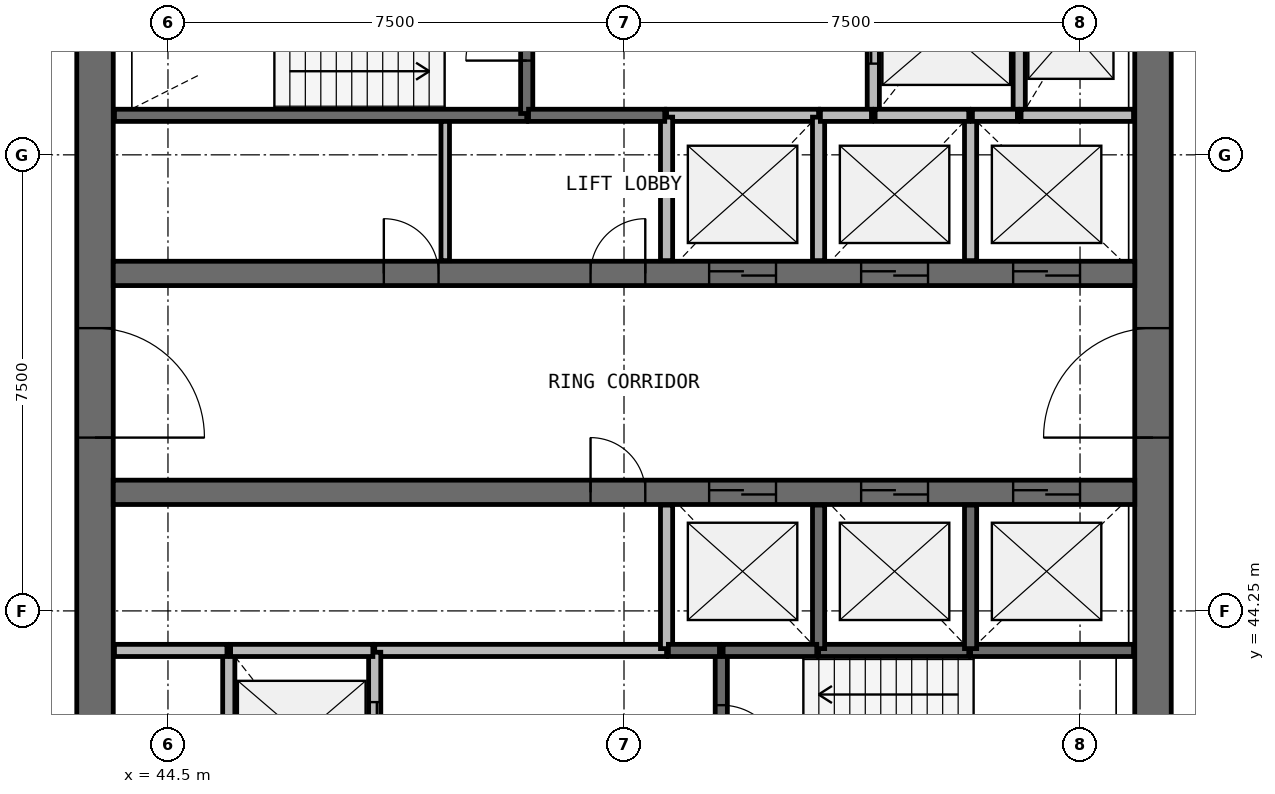
"""IFC4 building model, lengths in metres.
Left out: names, types, materials, properties, quantities, classifications, styles, units other than length and angle.
Written with IfcOpenShell. Run it as: python <this file> out.ifc"""

import sys

from ifc_helpers import new_model, si_unit, direction, frame, frame_2d, origin, place, context, subcontext, project, spatial, rectangle, extrude, source, transform, mapped, element, fill, save


model = new_model("IFC4")
c1 = context("Model", 3, precision=1e-05, world=origin(), true_north=direction((0.0, 1.0)))
c2 = subcontext(c1, "Body", "Model", "MODEL_VIEW")
j1 = project(units=[si_unit("LENGTHUNIT", "METRE"), si_unit("PLANEANGLEUNIT", "RADIAN")], contexts=[c1])
p1 = place(None, origin())
s1 = spatial("IfcSite", under=j1, at=p1, CompositionType="ELEMENT")
p2 = place(p1, origin())
s2 = spatial("IfcBuilding", under=s1, at=p2, CompositionType="ELEMENT")
p3 = place(p2, frame((0.0, 0.0, 199.4)))
s3 = spatial("IfcBuildingStorey", under=s2, at=p3, CompositionType="ELEMENT", Elevation=199.4)
p4 = place(p3, frame((60.7, 40.0, 0.0), z_axis=(0.0, 0.0, 1.0), x_axis=(0.0, 1.0, 0.0)))
e1 = element("IfcWall", 1, at=p4, inside=s3, PredefinedType="SHEAR", context=c2, shape_type="SweptSolid", body=[
    extrude(rectangle(XDim=16.0, YDim=0.6, at=frame_2d((8.0, 0.0))), origin(), (0.0, 0.0, 1.0), 3.9),
])
p5 = place(p4, frame((7.1, 0.0, 0.0)))
e2 = element("IfcOpeningElement", 2, at=p5, cuts=e1, PredefinedType="OPENING", context=c2, shape_type="SweptSolid", body=[
    extrude(rectangle(XDim=1.8, YDim=2.1, at=frame_2d((0.9, 1.05))), frame((0.0, 0.31, 0.0), z_axis=(0.0, -1.0, 0.0), x_axis=(1.0, 0.0, 0.0)), (0.0, 0.0, 1.0), 0.62),
])
p6 = place(p3, frame((43.3, 56.0, 0.0), z_axis=(0.0, 0.0, 1.0), x_axis=(0.0, -1.0, 0.0)))
e3 = element("IfcWall", 3, at=p6, inside=s3, PredefinedType="SHEAR", context=c2, shape_type="SweptSolid", body=[
    extrude(rectangle(XDim=16.0, YDim=0.6, at=frame_2d((8.0, 0.0))), origin(), (0.0, 0.0, 1.0), 3.9),
])
p7 = place(p6, frame((7.1, 0.0, 0.0)))
e4 = element("IfcOpeningElement", 4, at=p7, cuts=e3, PredefinedType="OPENING", context=c2, shape_type="SweptSolid", body=[
    extrude(rectangle(XDim=1.8, YDim=2.1, at=frame_2d((0.9, 1.05))), frame((0.0, 0.31, 0.0), z_axis=(0.0, -1.0, 0.0), x_axis=(1.0, 0.0, 0.0)), (0.0, 0.0, 1.0), 0.62),
])
p8 = place(p3, frame((43.6, 49.8, 0.0), z_axis=(0.0, 0.0, 1.0), x_axis=(1.0, 0.0, 0.0)))
e5 = element("IfcWall", 5, at=p8, inside=s3, PredefinedType="SHEAR", context=c2, shape_type="SweptSolid", body=[
    extrude(rectangle(XDim=16.8, YDim=0.4, at=frame_2d((8.4, 0.0))), origin(), (0.0, 0.0, 1.0), 3.9),
])
p9 = place(p8, frame((9.8, 0.0, 0.0)))
e6 = element("IfcOpeningElement", 6, at=p9, cuts=e5, PredefinedType="OPENING", context=c2, shape_type="SweptSolid", body=[
    extrude(rectangle(XDim=1.1, YDim=2.1, at=frame_2d((0.55, 1.05))), frame((0.0, 0.21, 0.0), z_axis=(0.0, -1.0, 0.0), x_axis=(1.0, 0.0, 0.0)), (0.0, 0.0, 1.0), 0.42),
])
p10 = place(p8, frame((12.3, 0.0, 0.0)))
e7 = element("IfcOpeningElement", 7, at=p10, cuts=e5, PredefinedType="OPENING", context=c2, shape_type="SweptSolid", body=[
    extrude(rectangle(XDim=1.1, YDim=2.1, at=frame_2d((0.55, 1.05))), frame((0.0, 0.21, 0.0), z_axis=(0.0, -1.0, 0.0), x_axis=(1.0, 0.0, 0.0)), (0.0, 0.0, 1.0), 0.42),
])
p11 = place(p8, frame((14.8, 0.0, 0.0)))
e8 = element("IfcOpeningElement", 8, at=p11, cuts=e5, PredefinedType="OPENING", context=c2, shape_type="SweptSolid", body=[
    extrude(rectangle(XDim=1.1, YDim=2.1, at=frame_2d((0.55, 1.05))), frame((0.0, 0.21, 0.0), z_axis=(0.0, -1.0, 0.0), x_axis=(1.0, 0.0, 0.0)), (0.0, 0.0, 1.0), 0.42),
])
p12 = place(p8, frame((4.45, 0.0, 0.0)))
e9 = element("IfcOpeningElement", 9, at=p12, cuts=e5, PredefinedType="OPENING", context=c2, shape_type="SweptSolid", body=[
    extrude(rectangle(XDim=0.9, YDim=2.1, at=frame_2d((0.45, 1.05))), frame((0.0, 0.21, 0.0), z_axis=(0.0, -1.0, 0.0), x_axis=(1.0, 0.0, 0.0)), (0.0, 0.0, 1.0), 0.42),
])
p13 = place(p8, frame((7.85, 0.0, 0.0)))
e10 = element("IfcOpeningElement", 10, at=p13, cuts=e5, PredefinedType="OPENING", context=c2, shape_type="SweptSolid", body=[
    extrude(rectangle(XDim=0.9, YDim=2.1, at=frame_2d((0.45, 1.05))), frame((0.0, 0.21, 0.0), z_axis=(0.0, -1.0, 0.0), x_axis=(1.0, 0.0, 0.0)), (0.0, 0.0, 1.0), 0.42),
])
p14 = place(p3, frame((43.6, 46.2, 0.0), z_axis=(0.0, 0.0, 1.0), x_axis=(1.0, 0.0, 0.0)))
e11 = element("IfcWall", 11, at=p14, inside=s3, PredefinedType="SHEAR", context=c2, shape_type="SweptSolid", body=[
    extrude(rectangle(XDim=16.8, YDim=0.4, at=frame_2d((8.4, 0.0))), origin(), (0.0, 0.0, 1.0), 3.9),
])
p15 = place(p14, frame((9.8, 0.0, 0.0)))
e12 = element("IfcOpeningElement", 12, at=p15, cuts=e11, PredefinedType="OPENING", context=c2, shape_type="SweptSolid", body=[
    extrude(rectangle(XDim=1.1, YDim=2.1, at=frame_2d((0.55, 1.05))), frame((0.0, 0.21, 0.0), z_axis=(0.0, -1.0, 0.0), x_axis=(1.0, 0.0, 0.0)), (0.0, 0.0, 1.0), 0.42),
])
p16 = place(p14, frame((12.3, 0.0, 0.0)))
e13 = element("IfcOpeningElement", 13, at=p16, cuts=e11, PredefinedType="OPENING", context=c2, shape_type="SweptSolid", body=[
    extrude(rectangle(XDim=1.1, YDim=2.1, at=frame_2d((0.55, 1.05))), frame((0.0, 0.21, 0.0), z_axis=(0.0, -1.0, 0.0), x_axis=(1.0, 0.0, 0.0)), (0.0, 0.0, 1.0), 0.42),
])
p17 = place(p14, frame((14.8, 0.0, 0.0)))
e14 = element("IfcOpeningElement", 14, at=p17, cuts=e11, PredefinedType="OPENING", context=c2, shape_type="SweptSolid", body=[
    extrude(rectangle(XDim=1.1, YDim=2.1, at=frame_2d((0.55, 1.05))), frame((0.0, 0.21, 0.0), z_axis=(0.0, -1.0, 0.0), x_axis=(1.0, 0.0, 0.0)), (0.0, 0.0, 1.0), 0.42),
])
p18 = place(p14, frame((7.85, 0.0, 0.0)))
e15 = element("IfcOpeningElement", 15, at=p18, cuts=e11, PredefinedType="OPENING", context=c2, shape_type="SweptSolid", body=[
    extrude(rectangle(XDim=0.9, YDim=2.1, at=frame_2d((0.45, 1.05))), frame((0.0, 0.21, 0.0), z_axis=(0.0, -1.0, 0.0), x_axis=(1.0, 0.0, 0.0)), (0.0, 0.0, 1.0), 0.42),
])
p19 = place(p3, frame((43.62, 52.4, 0.0), z_axis=(0.0, 0.0, 1.0), x_axis=(1.0, 0.0, 0.0)))
e16 = element("IfcWall", 16, at=p19, inside=s3, PredefinedType="SOLIDWALL", context=c2, shape_type="SweptSolid", body=[
    extrude(rectangle(XDim=6.78, YDim=0.2, at=frame_2d((3.39, 0.0))), origin(), (0.0, 0.0, 1.0), 3.58),
])
p20 = place(p3, frame((52.7, 43.6, 0.0), z_axis=(0.0, 0.0, 1.0), x_axis=(-1.0, 0.0, 0.0)))
e17 = element("IfcWall", 17, at=p20, inside=s3, PredefinedType="SOLIDWALL", context=c2, shape_type="SweptSolid", body=[
    extrude(rectangle(XDim=4.8, YDim=0.2, at=frame_2d((2.4, 0.0))), origin(), (0.0, 0.0, 1.0), 3.58),
])
p21 = place(p3, frame((45.5, 43.6, 0.0), z_axis=(0.0, 0.0, 1.0), x_axis=(0.0, -1.0, 0.0)))
e18 = element("IfcWall", 18, at=p21, inside=s3, PredefinedType="SOLIDWALL", context=c2, shape_type="SweptSolid", body=[
    extrude(rectangle(XDim=2.98, YDim=0.2, at=frame_2d((1.49, 0.0))), origin(), (0.0, 0.0, 1.0), 3.58),
])
p22 = place(p3, frame((47.9, 40.62, 0.0), z_axis=(0.0, 0.0, 1.0), x_axis=(0.0, 1.0, 0.0)))
e19 = element("IfcWall", 19, at=p22, inside=s3, PredefinedType="SOLIDWALL", context=c2, shape_type="SweptSolid", body=[
    extrude(rectangle(XDim=2.95, YDim=0.2, at=frame_2d((1.475, 0.0))), origin(), (0.0, 0.0, 1.0), 3.58),
])
p23 = place(p22, frame((1.03, 0.0, 0.0)))
e20 = element("IfcOpeningElement", 20, at=p23, cuts=e19, PredefinedType="OPENING", context=c2, shape_type="SweptSolid", body=[
    extrude(rectangle(XDim=1.1, YDim=2.1, at=frame_2d((0.55, 1.05))), frame((0.0, 0.11, 0.0), z_axis=(0.0, -1.0, 0.0), x_axis=(1.0, 0.0, 0.0)), (0.0, 0.0, 1.0), 0.22),
])
p24 = place(p3, frame((50.4, 52.43, 0.0), z_axis=(0.0, 0.0, 1.0), x_axis=(0.0, 1.0, 0.0)))
e21 = element("IfcWall", 21, at=p24, inside=s3, PredefinedType="SOLIDWALL", context=c2, shape_type="SweptSolid", body=[
    extrude(rectangle(XDim=2.95, YDim=0.2, at=frame_2d((1.475, 0.0))), origin(), (0.0, 0.0, 1.0), 3.58),
])
p25 = place(p24, frame((0.87, 0.0, 0.0)))
e22 = element("IfcOpeningElement", 22, at=p25, cuts=e21, PredefinedType="OPENING", context=c2, shape_type="SweptSolid", body=[
    extrude(rectangle(XDim=1.0, YDim=2.1, at=frame_2d((0.5, 1.05))), frame((0.0, 0.11, 0.0), z_axis=(0.0, -1.0, 0.0), x_axis=(1.0, 0.0, 0.0)), (0.0, 0.0, 1.0), 0.22),
])
p26 = place(p3, frame((53.6, 43.6, 0.0), z_axis=(0.0, 0.0, 1.0), x_axis=(0.0, -1.0, 0.0)))
e23 = element("IfcWall", 23, at=p26, inside=s3, PredefinedType="SOLIDWALL", context=c2, shape_type="SweptSolid", body=[
    extrude(rectangle(XDim=2.98, YDim=0.2, at=frame_2d((1.49, 0.0))), origin(), (0.0, 0.0, 1.0), 3.58),
])
p27 = place(p26, frame((0.9, 0.0, 0.0)))
e24 = element("IfcOpeningElement", 24, at=p27, cuts=e23, PredefinedType="OPENING", context=c2, shape_type="SweptSolid", body=[
    extrude(rectangle(XDim=1.0, YDim=2.1, at=frame_2d((0.5, 1.05))), frame((0.0, 0.11, 0.0), z_axis=(0.0, -1.0, 0.0), x_axis=(1.0, 0.0, 0.0)), (0.0, 0.0, 1.0), 0.22),
])
p28 = place(p3, frame((56.1, 55.38, 0.0), z_axis=(0.0, 0.0, 1.0), x_axis=(0.0, -1.0, 0.0)))
e25 = element("IfcWall", 25, at=p28, inside=s3, PredefinedType="SOLIDWALL", context=c2, shape_type="SweptSolid", body=[
    extrude(rectangle(XDim=2.98, YDim=0.2, at=frame_2d((1.49, 0.0))), origin(), (0.0, 0.0, 1.0), 3.58),
])
p29 = place(p28, frame((1.03, 0.0, 0.0)))
e26 = element("IfcOpeningElement", 26, at=p29, cuts=e25, PredefinedType="OPENING", context=c2, shape_type="SweptSolid", body=[
    extrude(rectangle(XDim=1.1, YDim=2.1, at=frame_2d((0.55, 1.05))), frame((0.0, 0.11, 0.0), z_axis=(0.0, -1.0, 0.0), x_axis=(1.0, 0.0, 0.0)), (0.0, 0.0, 1.0), 0.22),
])
p30 = place(p3, frame((58.5, 52.4, 0.0), z_axis=(0.0, 0.0, 1.0), x_axis=(0.0, 1.0, 0.0)))
e27 = element("IfcWall", 27, at=p30, inside=s3, PredefinedType="SOLIDWALL", context=c2, shape_type="SweptSolid", body=[
    extrude(rectangle(XDim=2.98, YDim=0.2, at=frame_2d((1.49, 0.0))), origin(), (0.0, 0.0, 1.0), 3.58),
])
p31 = place(p3, frame((57.7, 43.6, 0.0), z_axis=(0.0, 0.0, 1.0), x_axis=(1.0, 0.0, 0.0)))
e28 = element("IfcWall", 28, at=p31, inside=s3, PredefinedType="SOLIDWALL", context=c2, shape_type="SweptSolid", body=[
    extrude(rectangle(XDim=2.68, YDim=0.2, at=frame_2d((1.34, 0.0))), origin(), (0.0, 0.0, 1.0), 3.58),
])
p32 = place(p3, frame((55.2, 52.4, 0.0), z_axis=(0.0, 0.0, 1.0), x_axis=(-1.0, 0.0, 0.0)))
e29 = element("IfcWall", 29, at=p32, inside=s3, PredefinedType="SOLIDWALL", context=c2, shape_type="SweptSolid", body=[
    extrude(rectangle(XDim=2.5, YDim=0.2, at=frame_2d((1.25, 0.0))), origin(), (0.0, 0.0, 1.0), 3.58),
])
p33 = place(p3, frame((55.2, 43.6, 0.0), z_axis=(0.0, 0.0, 1.0), x_axis=(1.0, 0.0, 0.0)))
e30 = element("IfcWall", 30, at=p33, inside=s3, PredefinedType="SOLIDWALL", context=c2, shape_type="SweptSolid", body=[
    extrude(rectangle(XDim=2.47, YDim=0.2, at=frame_2d((1.235, 0.0))), origin(), (0.0, 0.0, 1.0), 3.58),
])
p34 = place(p3, frame((47.87, 43.6, 0.0), z_axis=(0.0, 0.0, 1.0), x_axis=(-1.0, 0.0, 0.0)))
e31 = element("IfcWall", 31, at=p34, inside=s3, PredefinedType="SOLIDWALL", context=c2, shape_type="SweptSolid", body=[
    extrude(rectangle(XDim=2.34, YDim=0.2, at=frame_2d((1.17, 0.0))), origin(), (0.0, 0.0, 1.0), 3.58),
])
for number, where, z_axis, x_axis in (
    (32, (52.7, 45.99, 0.0), (0.0, 0.0, 1.0), (0.0, -1.0, 0.0)),
    (33, (52.7, 52.37, 0.0), (0.0, 0.0, 1.0), (0.0, -1.0, 0.0)),
    (34, (55.2, 43.63, 0.0), (0.0, 0.0, 1.0), (0.0, 1.0, 0.0)),
    (35, (55.2, 50.01, 0.0), (0.0, 0.0, 1.0), (0.0, 1.0, 0.0)),
    (36, (57.7, 43.63, 0.0), (0.0, 0.0, 1.0), (0.0, 1.0, 0.0)),
):
    element("IfcWall", number, at=place(p3, frame(where, z_axis=z_axis, x_axis=x_axis)), inside=s3, PredefinedType="SOLIDWALL", context=c2, shape_type="SweptSolid", body=[
        extrude(rectangle(XDim=2.36, YDim=0.2, at=frame_2d((1.18, 0.0))), origin(), (0.0, 0.0, 1.0), 3.58),
    ])
p35 = place(p3, frame((57.7, 50.01, 0.0), z_axis=(0.0, 0.0, 1.0), x_axis=(0.0, 1.0, 0.0)))
e37 = element("IfcWall", 37, at=p35, inside=s3, PredefinedType="SOLIDWALL", context=c2, shape_type="SweptSolid", body=[
    extrude(rectangle(XDim=2.39, YDim=0.2, at=frame_2d((1.195, 0.0))), origin(), (0.0, 0.0, 1.0), 3.58),
])
p36 = place(p3, frame((50.43, 52.4, 0.0), z_axis=(0.0, 0.0, 1.0), x_axis=(1.0, 0.0, 0.0)))
e38 = element("IfcWall", 38, at=p36, inside=s3, PredefinedType="SOLIDWALL", context=c2, shape_type="SweptSolid", body=[
    extrude(rectangle(XDim=2.24, YDim=0.2, at=frame_2d((1.12, 0.0))), origin(), (0.0, 0.0, 1.0), 3.58),
])
for number, where, z_axis, x_axis in (
    (39, (45.47, 43.6, 0.0), (0.0, 0.0, 1.0), (-1.0, 0.0, 0.0)),
    (40, (60.38, 52.4, 0.0), (0.0, 0.0, 1.0), (-1.0, 0.0, 0.0)),
):
    element("IfcWall", number, at=place(p3, frame(where, z_axis=z_axis, x_axis=x_axis)), inside=s3, PredefinedType="SOLIDWALL", context=c2, shape_type="SweptSolid", body=[
        extrude(rectangle(XDim=1.85, YDim=0.2, at=frame_2d((0.925, 0.0))), origin(), (0.0, 0.0, 1.0), 3.58),
    ])
for number, where, z_axis, x_axis in (
    (41, (53.63, 43.6, 0.0), (0.0, 0.0, 1.0), (1.0, 0.0, 0.0)),
    (42, (57.67, 52.4, 0.0), (0.0, 0.0, 1.0), (-1.0, 0.0, 0.0)),
):
    element("IfcWall", number, at=place(p3, frame(where, z_axis=z_axis, x_axis=x_axis)), inside=s3, PredefinedType="SOLIDWALL", context=c2, shape_type="SweptSolid", body=[
        extrude(rectangle(XDim=1.54, YDim=0.2, at=frame_2d((0.77, 0.0))), origin(), (0.0, 0.0, 1.0), 3.58),
    ])
for number, where, z_axis, x_axis in (
    (43, (52.73, 43.6, 0.0), (0.0, 0.0, 1.0), (1.0, 0.0, 0.0)),
    (44, (56.07, 52.4, 0.0), (0.0, 0.0, 1.0), (-1.0, 0.0, 0.0)),
):
    element("IfcWall", number, at=place(p3, frame(where, z_axis=z_axis, x_axis=x_axis)), inside=s3, PredefinedType="SOLIDWALL", context=c2, shape_type="SweptSolid", body=[
        extrude(rectangle(XDim=0.84, YDim=0.2, at=frame_2d((0.42, 0.0))), origin(), (0.0, 0.0, 1.0), 3.58),
    ])
p37 = place(p3, frame((58.47, 52.4, 0.0), z_axis=(0.0, 0.0, 1.0), x_axis=(-1.0, 0.0, 0.0)))
e45 = element("IfcWall", 45, at=p37, inside=s3, PredefinedType="SOLIDWALL", context=c2, shape_type="SweptSolid", body=[
    extrude(rectangle(XDim=0.74, YDim=0.2, at=frame_2d((0.37, 0.0))), origin(), (0.0, 0.0, 1.0), 3.58),
])
p38 = place(p3, frame((49.06, 50.01, 0.0), z_axis=(0.0, 0.0, 1.0), x_axis=(0.0, 1.0, 0.0)))
e46 = element("IfcWall", 46, at=p38, inside=s3, PredefinedType="PARTITIONING", context=c2, shape_type="SweptSolid", body=[
    extrude(rectangle(XDim=2.29, YDim=0.14, at=frame_2d((1.145, 0.0))), origin(), (0.0, 0.0, 1.0), 2.88),
])
m1 = source(origin(), c2, "Body", "SweptSolid", [
    extrude(rectangle(XDim=1.8, YDim=2.1, at=frame_2d((0.9, 1.05))), frame((0.0, 0.025, 0.0), z_axis=(0.0, -1.0, 0.0), x_axis=(1.0, 0.0, 0.0)), (0.0, 0.0, 1.0), 0.05),
])
p39 = place(p7, origin())
e47 = element("IfcDoor", 47, at=p39, inside=s3, OperationType="SINGLE_SWING_RIGHT", PredefinedType="DOOR", context=c2, shape_type="MappedRepresentation", body=[
    mapped(m1, transform((0.0, 0.0, 0.0), scale=1.0)),
])
fill(e4, e47)
p40 = place(p5, origin())
e48 = element("IfcDoor", 48, at=p40, inside=s3, OperationType="SINGLE_SWING_LEFT", PredefinedType="DOOR", context=c2, shape_type="MappedRepresentation", body=[
    mapped(m1, transform((0.0, 0.0, 0.0), scale=1.0)),
])
fill(e2, e48)
m2 = source(origin(), c2, "Body", "SweptSolid", [
    extrude(rectangle(XDim=1.1, YDim=2.1, at=frame_2d((0.55, 1.05))), frame((0.0, 0.025, 0.0), z_axis=(0.0, -1.0, 0.0), x_axis=(1.0, 0.0, 0.0)), (0.0, 0.0, 1.0), 0.05),
])
p41 = place(p9, origin())
e49 = element("IfcDoor", 49, at=p41, inside=s3, OperationType="DOUBLE_DOOR_SLIDING", PredefinedType="USERDEFINED", context=c2, shape_type="MappedRepresentation", body=[
    mapped(m2, transform((0.0, 0.0, 0.0), scale=1.0)),
])
fill(e6, e49)
p42 = place(p10, origin())
e50 = element("IfcDoor", 50, at=p42, inside=s3, OperationType="DOUBLE_DOOR_SLIDING", PredefinedType="USERDEFINED", context=c2, shape_type="MappedRepresentation", body=[
    mapped(m2, transform((0.0, 0.0, 0.0), scale=1.0)),
])
fill(e7, e50)
p43 = place(p11, origin())
e51 = element("IfcDoor", 51, at=p43, inside=s3, OperationType="DOUBLE_DOOR_SLIDING", PredefinedType="USERDEFINED", context=c2, shape_type="MappedRepresentation", body=[
    mapped(m2, transform((0.0, 0.0, 0.0), scale=1.0)),
])
fill(e8, e51)
p44 = place(p15, origin())
e52 = element("IfcDoor", 52, at=p44, inside=s3, OperationType="DOUBLE_DOOR_SLIDING", PredefinedType="USERDEFINED", context=c2, shape_type="MappedRepresentation", body=[
    mapped(m2, transform((0.0, 0.0, 0.0), scale=1.0)),
])
fill(e12, e52)
p45 = place(p16, origin())
e53 = element("IfcDoor", 53, at=p45, inside=s3, OperationType="DOUBLE_DOOR_SLIDING", PredefinedType="USERDEFINED", context=c2, shape_type="MappedRepresentation", body=[
    mapped(m2, transform((0.0, 0.0, 0.0), scale=1.0)),
])
fill(e13, e53)
p46 = place(p17, origin())
e54 = element("IfcDoor", 54, at=p46, inside=s3, OperationType="DOUBLE_DOOR_SLIDING", PredefinedType="USERDEFINED", context=c2, shape_type="MappedRepresentation", body=[
    mapped(m2, transform((0.0, 0.0, 0.0), scale=1.0)),
])
fill(e14, e54)
p47 = place(p29, origin())
e55 = element("IfcDoor", 55, at=p47, inside=s3, OperationType="DOUBLE_DOOR_SLIDING", PredefinedType="USERDEFINED", context=c2, shape_type="MappedRepresentation", body=[
    mapped(m2, transform((0.0, 0.0, 0.0), scale=1.0)),
])
fill(e26, e55)
p48 = place(p23, origin())
e56 = element("IfcDoor", 56, at=p48, inside=s3, OperationType="DOUBLE_DOOR_SLIDING", PredefinedType="USERDEFINED", context=c2, shape_type="MappedRepresentation", body=[
    mapped(m2, transform((0.0, 0.0, 0.0), scale=1.0)),
])
fill(e20, e56)
m3 = source(origin(), c2, "Body", "SweptSolid", [
    extrude(rectangle(XDim=1.0, YDim=2.1, at=frame_2d((0.5, 1.05))), frame((0.0, 0.025, 0.0), z_axis=(0.0, -1.0, 0.0), x_axis=(1.0, 0.0, 0.0)), (0.0, 0.0, 1.0), 0.05),
])
p49 = place(p25, origin())
e57 = element("IfcDoor", 57, at=p49, inside=s3, OperationType="SINGLE_SWING_LEFT", PredefinedType="DOOR", context=c2, shape_type="MappedRepresentation", body=[
    mapped(m3, transform((0.0, 0.0, 0.0), scale=1.0)),
])
fill(e22, e57)
p50 = place(p27, origin())
e58 = element("IfcDoor", 58, at=p50, inside=s3, OperationType="SINGLE_SWING_RIGHT", PredefinedType="DOOR", context=c2, shape_type="MappedRepresentation", body=[
    mapped(m3, transform((0.0, 0.0, 0.0), scale=1.0)),
])
fill(e24, e58)
m4 = source(origin(), c2, "Body", "SweptSolid", [
    extrude(rectangle(XDim=0.9, YDim=2.1, at=frame_2d((0.45, 1.05))), frame((0.0, 0.025, 0.0), z_axis=(0.0, -1.0, 0.0), x_axis=(1.0, 0.0, 0.0)), (0.0, 0.0, 1.0), 0.05),
])
p51 = place(p12, origin())
e59 = element("IfcDoor", 59, at=p51, inside=s3, OperationType="SINGLE_SWING_LEFT", PredefinedType="DOOR", context=c2, shape_type="MappedRepresentation", body=[
    mapped(m4, transform((0.0, 0.0, 0.0), scale=1.0)),
])
fill(e9, e59)
p52 = place(p13, origin())
e60 = element("IfcDoor", 60, at=p52, inside=s3, OperationType="SINGLE_SWING_RIGHT", PredefinedType="DOOR", context=c2, shape_type="MappedRepresentation", body=[
    mapped(m4, transform((0.0, 0.0, 0.0), scale=1.0)),
])
fill(e10, e60)
p53 = place(p18, origin())
e61 = element("IfcDoor", 61, at=p53, inside=s3, OperationType="SINGLE_SWING_LEFT", PredefinedType="DOOR", context=c2, shape_type="MappedRepresentation", body=[
    mapped(m4, transform((0.0, 0.0, 0.0), scale=1.0)),
])
fill(e15, e61)
save(model, sys.argv[1])
